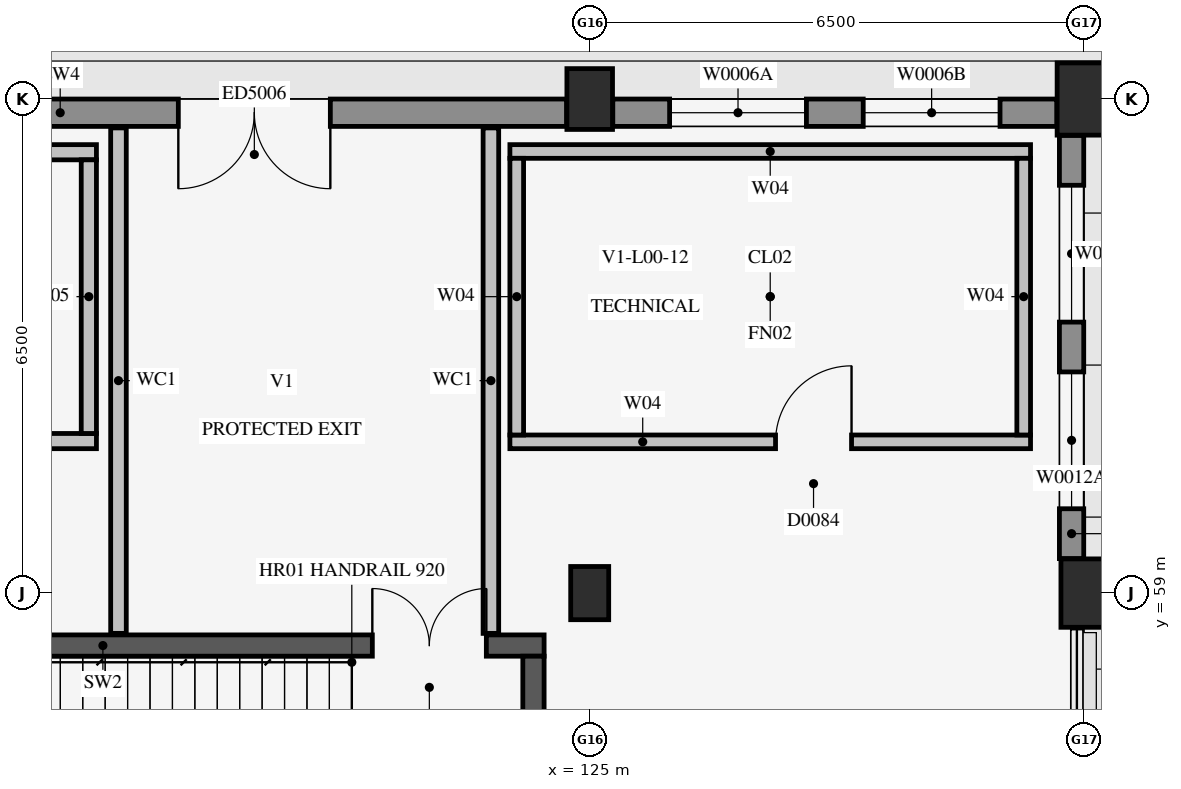
"""IFC4 building model, lengths in metres.
Left out: names, types, materials, properties, quantities, classifications, styles, units other than length and angle.
Written with IfcOpenShell. Run it as: python <this file> out.ifc"""

import sys

from ifc_helpers import new_model, si_unit, direction, frame, frame_2d, origin, origin_2d, place, context, subcontext, project, spatial, rectangle, extrude, element, fill, save


model = new_model("IFC4")
c1 = context("Model", 3, precision=1e-05, world=origin(), true_north=direction((0.0, 1.0)))
c2 = subcontext(c1, "Body", "Model", "MODEL_VIEW")
j1 = project(units=[si_unit("LENGTHUNIT", "METRE"), si_unit("PLANEANGLEUNIT", "RADIAN")], contexts=[c1])
p1 = place(None, origin())
s1 = spatial("IfcSite", under=j1, at=p1, CompositionType="ELEMENT")
p2 = place(p1, origin())
s2 = spatial("IfcBuilding", under=s1, at=p2, CompositionType="ELEMENT")
p3 = place(p2, origin())
s3 = spatial("IfcBuildingStorey", under=s2, at=p3, CompositionType="ELEMENT", Elevation=0.0)
p4 = place(p3, frame((115.05, 58.31, 0.0), z_axis=(0.0, 0.0, 1.0), x_axis=(1.0, 0.0, 0.0)))
e1 = element("IfcWall", 1, at=p4, inside=s3, PredefinedType="SHEAR", context=c2, shape_type="SweptSolid", body=[
    extrude(rectangle(XDim=9.35, YDim=0.28, at=frame_2d((4.675, 0.0))), origin(), (0.0, 0.0, 1.0), 5.14),
])
p5 = place(p4, frame((7.09, 0.0, 0.0)))
e2 = element("IfcOpeningElement", 2, at=p5, cuts=e1, PredefinedType="OPENING", context=c2, shape_type="SweptSolid", body=[
    extrude(rectangle(XDim=1.5, YDim=2.3, at=frame_2d((0.75, 1.15))), frame((0.0, 0.152, 0.0), z_axis=(0.0, -1.0, 0.0), x_axis=(1.0, 0.0, 0.0)), (0.0, 0.0, 1.0), 0.304),
])
p6 = place(p3, frame((124.26, 53.53, 0.0), z_axis=(0.0, 0.0, 1.0), x_axis=(0.0, 1.0, 0.0)))
e3 = element("IfcWall", 3, at=p6, inside=s3, PredefinedType="SHEAR", context=c2, shape_type="SweptSolid", body=[
    extrude(rectangle(XDim=4.64, YDim=0.28, at=frame_2d((2.32, 0.0))), origin(), (0.0, 0.0, 1.0), 5.14),
])
p7 = place(p3, frame((125.0, 59.0, 0.0), z_axis=(0.0, 0.0, 1.0), x_axis=(1.0, 0.0, 0.0)))
e4 = element("IfcColumn", 4, at=p7, inside=s3, PredefinedType="COLUMN", context=c2, shape_type="SweptSolid", body=[
    extrude(rectangle(XDim=0.5, YDim=0.7, at=origin_2d()), origin(), (0.0, 0.0, 1.0), 5.4),
])
p8 = place(p3, frame((125.0, 65.5, 0.0), z_axis=(0.0, 0.0, 1.0), x_axis=(1.0, 0.0, 0.0)))
e5 = element("IfcColumn", 5, at=p8, inside=s3, PredefinedType="COLUMN", context=c2, shape_type="SweptSolid", body=[
    extrude(rectangle(XDim=0.6, YDim=0.8, at=origin_2d()), origin(), (0.0, 0.0, 1.0), 5.4),
])
p9 = place(p3, frame((131.5, 59.0, 0.0), z_axis=(0.0, 0.0, 1.0), x_axis=(1.0, 0.0, 0.0)))
e6 = element("IfcColumn", 6, at=p9, inside=s3, PredefinedType="COLUMN", context=c2, shape_type="SweptSolid", body=[
    extrude(rectangle(XDim=0.6, YDim=0.9, at=origin_2d()), origin(), (0.0, 0.0, 1.0), 5.4),
])
p10 = place(p3, frame((131.5, 65.5, 0.0), z_axis=(0.0, 0.0, 1.0), x_axis=(1.0, 0.0, 0.0)))
e7 = element("IfcColumn", 7, at=p10, inside=s3, PredefinedType="COLUMN", context=c2, shape_type="SweptSolid", body=[
    extrude(rectangle(XDim=0.7, YDim=0.95, at=origin_2d()), origin(), (0.0, 0.0, 1.0), 5.4),
])
for number, where, z_axis, x_axis in (
    (8, (118.8, 58.47, 0.0), (0.0, 0.0, 1.0), (0.0, 1.0, 0.0)),
    (9, (123.7, 58.47, 0.0), (0.0, 0.0, 1.0), (0.0, 1.0, 0.0)),
):
    element("IfcWall", number, at=place(p3, frame(where, z_axis=z_axis, x_axis=x_axis)), inside=s3, PredefinedType="SOLIDWALL", context=c2, shape_type="SweptSolid", body=[
        extrude(rectangle(XDim=6.65, YDim=0.205, at=frame_2d((3.325, 0.0))), origin(), (0.0, 0.0, 1.0), 5.14),
    ])
p11 = place(p3, frame((113.015, 61.0, 0.0), z_axis=(0.0, 0.0, 1.0), x_axis=(1.0, 0.0, 0.0)))
e10 = element("IfcWall", 10, at=p11, inside=s3, PredefinedType="PLUMBINGWALL", context=c2, shape_type="SweptSolid", body=[
    extrude(rectangle(XDim=5.495, YDim=0.2, at=frame_2d((2.748, 0.0))), origin(), (0.0, 0.0, 1.0), 5.125),
])
p12 = place(p11, frame((1.424, 0.0, 0.0)))
e11 = element("IfcOpeningElement", 11, at=p12, cuts=e10, PredefinedType="OPENING", context=c2, shape_type="SweptSolid", body=[
    extrude(rectangle(XDim=0.9, YDim=2.1, at=frame_2d((0.45, 1.05))), frame((0.0, 0.112, 0.0), z_axis=(0.0, -1.0, 0.0), x_axis=(1.0, 0.0, 0.0)), (0.0, 0.0, 1.0), 0.224),
])
p13 = place(p3, frame((113.015, 64.8, 0.0), z_axis=(0.0, 0.0, 1.0), x_axis=(1.0, 0.0, 0.0)))
e12 = element("IfcWall", 12, at=p13, inside=s3, PredefinedType="PLUMBINGWALL", context=c2, shape_type="SweptSolid", body=[
    extrude(rectangle(XDim=5.495, YDim=0.2, at=frame_2d((2.748, 0.0))), origin(), (0.0, 0.0, 1.0), 5.125),
])
p14 = place(p3, frame((118.41, 61.1, 0.0), z_axis=(0.0, 0.0, 1.0), x_axis=(0.0, 1.0, 0.0)))
e13 = element("IfcWall", 13, at=p14, inside=s3, PredefinedType="PLUMBINGWALL", context=c2, shape_type="SweptSolid", body=[
    extrude(rectangle(XDim=3.6, YDim=0.2, at=frame_2d((1.8, 0.0))), origin(), (0.0, 0.0, 1.0), 5.125),
])
p15 = place(p3, frame((123.95, 60.99, 0.0), z_axis=(0.0, 0.0, 1.0), x_axis=(1.0, 0.0, 0.0)))
e14 = element("IfcWall", 14, at=p15, inside=s3, PredefinedType="PARTITIONING", context=c2, shape_type="SweptSolid", body=[
    extrude(rectangle(XDim=6.85, YDim=0.18, at=frame_2d((3.425, 0.0))), origin(), (0.0, 0.0, 1.0), 5.125),
])
p16 = place(p15, frame((3.495, 0.0, 0.0)))
e15 = element("IfcOpeningElement", 15, at=p16, cuts=e14, PredefinedType="OPENING", context=c2, shape_type="SweptSolid", body=[
    extrude(rectangle(XDim=1.0, YDim=2.2, at=frame_2d((0.5, 1.1))), frame((0.0, 0.102, 0.0), z_axis=(0.0, -1.0, 0.0), x_axis=(1.0, 0.0, 0.0)), (0.0, 0.0, 1.0), 0.204),
])
p17 = place(p3, frame((123.95, 64.81, 0.0), z_axis=(0.0, 0.0, 1.0), x_axis=(1.0, 0.0, 0.0)))
e16 = element("IfcWall", 16, at=p17, inside=s3, PredefinedType="PARTITIONING", context=c2, shape_type="SweptSolid", body=[
    extrude(rectangle(XDim=6.85, YDim=0.18, at=frame_2d((3.425, 0.0))), origin(), (0.0, 0.0, 1.0), 5.125),
])
for number, where, z_axis, x_axis in (
    (17, (130.71, 61.08, 0.0), (0.0, 0.0, 1.0), (0.0, 1.0, 0.0)),
    (18, (124.04, 61.08, 0.0), (0.0, 0.0, 1.0), (0.0, 1.0, 0.0)),
):
    element("IfcWall", number, at=place(p3, frame(where, z_axis=z_axis, x_axis=x_axis)), inside=s3, PredefinedType="PARTITIONING", context=c2, shape_type="SweptSolid", body=[
        extrude(rectangle(XDim=3.64, YDim=0.18, at=frame_2d((1.82, 0.0))), origin(), (0.0, 0.0, 1.0), 5.125),
    ])
p18 = place(p3, frame((116.479, 65.32, 0.0), z_axis=(0.0, 0.0, 1.0), x_axis=(1.0, 0.0, 0.0)))
e19 = element("IfcWall", 19, at=p18, inside=s3, PredefinedType="SOLIDWALL", context=c2, shape_type="SweptSolid", body=[
    extrude(rectangle(XDim=8.217, YDim=0.36, at=frame_2d((4.108, 0.0))), origin(), (0.0, 0.0, 1.0), 4.537),
])
p19 = place(p18, frame((3.108, 0.0, 0.0)))
e20 = element("IfcOpeningElement", 20, at=p19, cuts=e19, PredefinedType="OPENING", context=c2, shape_type="SweptSolid", body=[
    extrude(rectangle(XDim=2.0, YDim=2.4, at=frame_2d((1.0, 1.2))), frame((0.0, 0.192, 0.0), z_axis=(0.0, -1.0, 0.0), x_axis=(1.0, 0.0, 0.0)), (0.0, 0.0, 1.0), 0.384),
])
p20 = place(p3, frame((125.304, 65.32, 0.0), z_axis=(0.0, 0.0, 1.0), x_axis=(1.0, 0.0, 0.0)))
e21 = element("IfcWall", 21, at=p20, inside=s3, PredefinedType="SOLIDWALL", context=c2, shape_type="SweptSolid", body=[
    extrude(rectangle(XDim=5.842, YDim=0.36, at=frame_2d((2.921, 0.0))), origin(), (0.0, 0.0, 1.0), 4.453),
])
p21 = place(p20, frame((0.747, 0.0, 0.95)))
e22 = element("IfcOpeningElement", 22, at=p21, cuts=e21, PredefinedType="OPENING", context=c2, shape_type="SweptSolid", body=[
    extrude(rectangle(XDim=1.8, YDim=1.8, at=frame_2d((0.9, 0.9))), frame((0.0, 0.192, 0.0), z_axis=(0.0, -1.0, 0.0), x_axis=(1.0, 0.0, 0.0)), (0.0, 0.0, 1.0), 0.384),
])
p22 = place(p20, frame((3.295, 0.0, 0.95)))
e23 = element("IfcOpeningElement", 23, at=p22, cuts=e21, PredefinedType="OPENING", context=c2, shape_type="SweptSolid", body=[
    extrude(rectangle(XDim=1.8, YDim=1.8, at=frame_2d((0.9, 0.9))), frame((0.0, 0.192, 0.0), z_axis=(0.0, -1.0, 0.0), x_axis=(1.0, 0.0, 0.0)), (0.0, 0.0, 1.0), 0.384),
])
p23 = place(p3, frame((131.34, 59.454, 0.0), z_axis=(0.0, 0.0, 1.0), x_axis=(0.0, 1.0, 0.0)))
e24 = element("IfcWall", 24, at=p23, inside=s3, PredefinedType="SOLIDWALL", context=c2, shape_type="SweptSolid", body=[
    extrude(rectangle(XDim=5.567, YDim=0.32, at=frame_2d((2.783, 0.0))), origin(), (0.0, 0.0, 1.0), 4.151),
])
p24 = place(p23, frame((0.656, 0.0, 0.95)))
e25 = element("IfcOpeningElement", 25, at=p24, cuts=e24, PredefinedType="OPENING", context=c2, shape_type="SweptSolid", body=[
    extrude(rectangle(XDim=1.8, YDim=0.9, at=frame_2d((0.9, 0.45))), frame((0.0, 0.172, 0.0), z_axis=(0.0, -1.0, 0.0), x_axis=(1.0, 0.0, 0.0)), (0.0, 0.0, 1.0), 0.344),
])
p25 = place(p23, frame((3.111, 0.0, 0.95)))
e26 = element("IfcOpeningElement", 26, at=p25, cuts=e24, PredefinedType="OPENING", context=c2, shape_type="SweptSolid", body=[
    extrude(rectangle(XDim=1.8, YDim=0.9, at=frame_2d((0.9, 0.45))), frame((0.0, 0.172, 0.0), z_axis=(0.0, -1.0, 0.0), x_axis=(1.0, 0.0, 0.0)), (0.0, 0.0, 1.0), 0.344),
])
p26 = place(p5, origin())
e27 = element("IfcDoor", 27, at=p26, inside=s3, OperationType="DOUBLE_DOOR_SINGLE_SWING", PredefinedType="DOOR", context=c2, shape_type="SweptSolid", body=[
    extrude(rectangle(XDim=1.5, YDim=2.3, at=frame_2d((0.75, 1.15))), frame((0.0, 0.025, 0.0), z_axis=(0.0, -1.0, 0.0), x_axis=(1.0, 0.0, 0.0)), (0.0, 0.0, 1.0), 0.05),
])
fill(e2, e27)
p27 = place(p16, origin())
e28 = element("IfcDoor", 28, at=p27, inside=s3, OperationType="SINGLE_SWING_RIGHT", PredefinedType="DOOR", context=c2, shape_type="SweptSolid", body=[
    extrude(rectangle(XDim=1.0, YDim=2.2, at=frame_2d((0.5, 1.1))), frame((0.0, 0.025, 0.0), z_axis=(0.0, -1.0, 0.0), x_axis=(1.0, 0.0, 0.0)), (0.0, 0.0, 1.0), 0.05),
])
fill(e15, e28)
p28 = place(p19, origin())
e29 = element("IfcDoor", 29, at=p28, inside=s3, OperationType="DOUBLE_DOOR_SINGLE_SWING", PredefinedType="DOOR", context=c2, shape_type="SweptSolid", body=[
    extrude(rectangle(XDim=2.0, YDim=2.4, at=frame_2d((1.0, 1.2))), frame((0.0, 0.025, 0.0), z_axis=(0.0, -1.0, 0.0), x_axis=(1.0, 0.0, 0.0)), (0.0, 0.0, 1.0), 0.05),
])
fill(e20, e29)
p29 = place(p21, origin())
e30 = element("IfcWindow", 30, at=p29, inside=s3, PartitioningType="SINGLE_PANEL", PredefinedType="WINDOW", context=c2, shape_type="SweptSolid", body=[
    extrude(rectangle(XDim=1.8, YDim=1.8, at=frame_2d((0.9, 0.9))), frame((0.0, 0.03, 0.0), z_axis=(0.0, -1.0, 0.0), x_axis=(1.0, 0.0, 0.0)), (0.0, 0.0, 1.0), 0.06),
])
fill(e22, e30)
p30 = place(p22, origin())
e31 = element("IfcWindow", 31, at=p30, inside=s3, PartitioningType="SINGLE_PANEL", PredefinedType="WINDOW", context=c2, shape_type="SweptSolid", body=[
    extrude(rectangle(XDim=1.8, YDim=1.8, at=frame_2d((0.9, 0.9))), frame((0.0, 0.03, 0.0), z_axis=(0.0, -1.0, 0.0), x_axis=(1.0, 0.0, 0.0)), (0.0, 0.0, 1.0), 0.06),
])
fill(e23, e31)
p31 = place(p24, origin())
e32 = element("IfcWindow", 32, at=p31, inside=s3, PartitioningType="SINGLE_PANEL", PredefinedType="WINDOW", context=c2, shape_type="SweptSolid", body=[
    extrude(rectangle(XDim=1.8, YDim=0.9, at=frame_2d((0.9, 0.45))), frame((0.0, 0.03, 0.0), z_axis=(0.0, -1.0, 0.0), x_axis=(1.0, 0.0, 0.0)), (0.0, 0.0, 1.0), 0.06),
])
fill(e25, e32)
p32 = place(p25, origin())
e33 = element("IfcWindow", 33, at=p32, inside=s3, PartitioningType="SINGLE_PANEL", PredefinedType="WINDOW", context=c2, shape_type="SweptSolid", body=[
    extrude(rectangle(XDim=1.8, YDim=0.9, at=frame_2d((0.9, 0.45))), frame((0.0, 0.03, 0.0), z_axis=(0.0, -1.0, 0.0), x_axis=(1.0, 0.0, 0.0)), (0.0, 0.0, 1.0), 0.06),
])
fill(e26, e33)
save(model, sys.argv[1])
